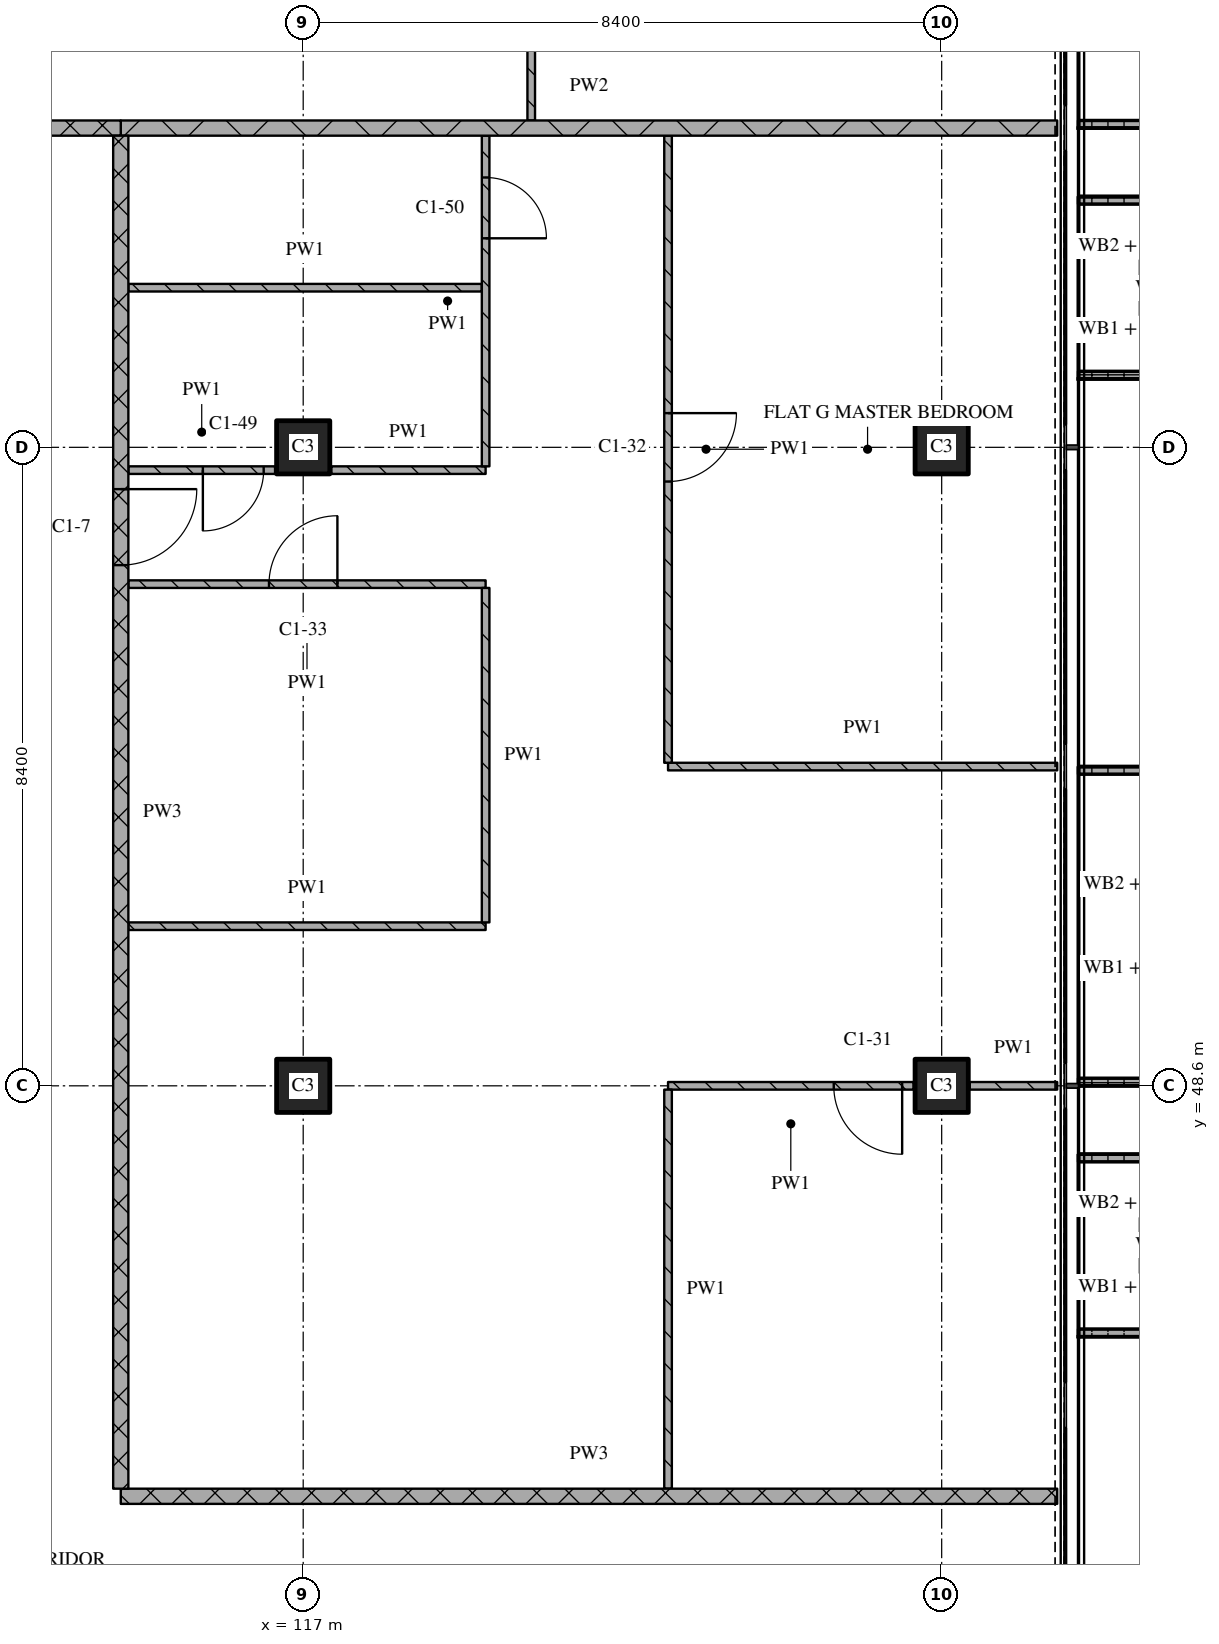
"""IFC4 building model, lengths in metres.
Left out: names, types, materials, properties, quantities, classifications, styles, units other than length and angle.
Written with IfcOpenShell. Run it as: python <this file> out.ifc"""

import sys

from ifc_helpers import new_model, si_unit, direction, frame, frame_2d, origin, origin_2d, place, context, subcontext, project, spatial, polyline, rectangle, outline, extrude, element, fill, save


model = new_model("IFC4")
c1 = context("Model", 3, precision=1e-05, world=origin(), true_north=direction((0.0, 1.0)))
c2 = subcontext(c1, "Body", "Model", "MODEL_VIEW")
j1 = project(units=[si_unit("LENGTHUNIT", "METRE"), si_unit("PLANEANGLEUNIT", "RADIAN")], contexts=[c1])
p1 = place(None, origin())
s1 = spatial("IfcSite", under=j1, at=p1, CompositionType="ELEMENT")
p2 = place(p1, origin())
s2 = spatial("IfcBuilding", under=s1, at=p2, CompositionType="ELEMENT")
p3 = place(p2, frame((0.0, 0.0, 147.45)))
s3 = spatial("IfcBuildingStorey", under=s2, at=p3, CompositionType="ELEMENT", Elevation=147.45)
for number, where, z_axis, x_axis in (
    (1, (117.0, 48.6, 0.0), (0.0, 0.0, 1.0), (1.0, 0.0, 0.0)),
    (2, (117.0, 57.0, 0.0), (0.0, 0.0, 1.0), (1.0, 0.0, 0.0)),
    (3, (125.4, 48.6, 0.0), (0.0, 0.0, 1.0), (1.0, 0.0, 0.0)),
    (4, (125.4, 57.0, 0.0), (0.0, 0.0, 1.0), (1.0, 0.0, 0.0)),
):
    element("IfcColumn", number, at=place(p3, frame(where, z_axis=z_axis, x_axis=x_axis)), inside=s3, PredefinedType="COLUMN", context=c2, shape_type="SweptSolid", body=[
        extrude(rectangle(XDim=0.7, YDim=0.7, at=origin_2d()), origin(), (0.0, 0.0, 1.0), 3.6),
    ])
p4 = place(p3, origin())
e5 = element("IfcWall", 5, at=p4, inside=s3, PredefinedType="SOLIDWALL", context=c2, shape_type="SweptSolid", body=[
    extrude(outline(polyline([(127.2, 45.3), (127.2, 45.4), (128.7, 45.4), (128.7, 47.6), (127.2, 47.6), (127.2, 47.7), (128.8, 47.7), (128.8, 45.3), (127.2, 45.3)])), origin(), (0.0, 0.0, 1.0), 1.0),
])
p5 = place(p3, origin())
e6 = element("IfcWall", 6, at=p5, inside=s3, PredefinedType="SOLIDWALL", context=c2, shape_type="SweptSolid", body=[
    extrude(outline(polyline([(127.2, 48.6), (127.2, 48.7), (128.833, 48.7), (128.833, 52.7), (127.2, 52.7), (127.2, 52.8), (128.933, 52.8), (128.933, 48.6), (127.2, 48.6)])), origin(), (0.0, 0.0, 1.0), 1.0),
])
p6 = place(p3, origin())
e7 = element("IfcWall", 7, at=p6, inside=s3, PredefinedType="SOLIDWALL", context=c2, shape_type="SweptSolid", body=[
    extrude(outline(polyline([(127.2, 57.9), (127.2, 58.0), (128.7, 58.0), (128.7, 60.2), (127.2, 60.2), (127.2, 60.3), (128.8, 60.3), (128.8, 57.9), (127.2, 57.9)])), origin(), (0.0, 0.0, 1.0), 1.0),
])
p7 = place(p3, origin())
e8 = element("IfcWall", 8, at=p7, inside=s3, PredefinedType="SOLIDWALL", context=c2, shape_type="SweptSolid", body=[
    extrude(outline(polyline([(127.2, 61.2), (127.2, 61.3), (128.833, 61.3), (128.833, 65.3), (127.2, 65.3), (127.2, 65.4), (128.933, 65.4), (128.933, 61.2), (127.2, 61.2)])), origin(), (0.0, 0.0, 1.0), 1.0),
])
p8 = place(p3, frame((114.6, 43.2, 0.0), z_axis=(0.0, 0.0, 1.0), x_axis=(1.0, 0.0, 0.0)))
e9 = element("IfcWall", 9, at=p8, inside=s3, PredefinedType="PARTITIONING", context=c2, shape_type="SweptSolid", body=[
    extrude(rectangle(XDim=12.32, YDim=0.2, at=frame_2d((6.16, 0.0))), origin(), (0.0, 0.0, 1.0), 3.32),
])
p9 = place(p3, frame((125.03, 48.6, 0.0), z_axis=(0.0, 0.0, 1.0), x_axis=(-1.0, 0.0, 0.0)))
e10 = element("IfcWall", 10, at=p9, inside=s3, PredefinedType="PARTITIONING", context=c2, shape_type="SweptSolid", body=[
    extrude(rectangle(XDim=3.23, YDim=0.1, at=frame_2d((1.615, 0.0))), origin(), (0.0, 0.0, 1.0), 3.32),
])
p10 = place(p9, frame((0.15, 0.0, 0.0)))
e11 = element("IfcOpeningElement", 11, at=p10, cuts=e10, PredefinedType="OPENING", context=c2, shape_type="SweptSolid", body=[
    extrude(rectangle(XDim=0.9, YDim=2.1, at=frame_2d((0.45, 1.05))), frame((0.0, 0.06, 0.0), z_axis=(0.0, -1.0, 0.0), x_axis=(1.0, 0.0, 0.0)), (0.0, 0.0, 1.0), 0.12),
])
p11 = place(p3, frame((125.77, 48.6, 0.0), z_axis=(0.0, 0.0, 1.0), x_axis=(1.0, 0.0, 0.0)))
e12 = element("IfcWall", 12, at=p11, inside=s3, PredefinedType="PARTITIONING", context=c2, shape_type="SweptSolid", body=[
    extrude(rectangle(XDim=1.15, YDim=0.1, at=frame_2d((0.575, 0.0))), origin(), (0.0, 0.0, 1.0), 3.32),
])
p12 = place(p3, frame((114.7, 50.7, 0.0), z_axis=(0.0, 0.0, 1.0), x_axis=(1.0, 0.0, 0.0)))
e13 = element("IfcWall", 13, at=p12, inside=s3, PredefinedType="PARTITIONING", context=c2, shape_type="SweptSolid", body=[
    extrude(rectangle(XDim=4.7, YDim=0.1, at=frame_2d((2.35, 0.0))), origin(), (0.0, 0.0, 1.0), 3.32),
])
p13 = place(p3, frame((121.8, 52.8, 0.0), z_axis=(0.0, 0.0, 1.0), x_axis=(1.0, 0.0, 0.0)))
e14 = element("IfcWall", 14, at=p13, inside=s3, PredefinedType="PARTITIONING", context=c2, shape_type="SweptSolid", body=[
    extrude(rectangle(XDim=5.12, YDim=0.1, at=frame_2d((2.56, 0.0))), origin(), (0.0, 0.0, 1.0), 3.32),
])
p14 = place(p3, frame((119.4, 55.2, 0.0), z_axis=(0.0, 0.0, 1.0), x_axis=(-1.0, 0.0, 0.0)))
e15 = element("IfcWall", 15, at=p14, inside=s3, PredefinedType="PARTITIONING", context=c2, shape_type="SweptSolid", body=[
    extrude(rectangle(XDim=4.7, YDim=0.1, at=frame_2d((2.35, 0.0))), origin(), (0.0, 0.0, 1.0), 3.32),
])
p15 = place(p14, frame((1.95, 0.0, 0.0)))
e16 = element("IfcOpeningElement", 16, at=p15, cuts=e15, PredefinedType="OPENING", context=c2, shape_type="SweptSolid", body=[
    extrude(rectangle(XDim=0.9, YDim=2.1, at=frame_2d((0.45, 1.05))), frame((0.0, 0.06, 0.0), z_axis=(0.0, -1.0, 0.0), x_axis=(1.0, 0.0, 0.0)), (0.0, 0.0, 1.0), 0.12),
])
p16 = place(p3, frame((114.7, 56.7, 0.0), z_axis=(0.0, 0.0, 1.0), x_axis=(1.0, 0.0, 0.0)))
e17 = element("IfcWall", 17, at=p16, inside=s3, PredefinedType="PARTITIONING", context=c2, shape_type="SweptSolid", body=[
    extrude(rectangle(XDim=1.93, YDim=0.1, at=frame_2d((0.965, 0.0))), origin(), (0.0, 0.0, 1.0), 3.32),
])
p17 = place(p16, frame((0.98, 0.0, 0.0)))
e18 = element("IfcOpeningElement", 18, at=p17, cuts=e17, PredefinedType="OPENING", context=c2, shape_type="SweptSolid", body=[
    extrude(rectangle(XDim=0.8, YDim=2.1, at=frame_2d((0.4, 1.05))), frame((0.0, 0.06, 0.0), z_axis=(0.0, -1.0, 0.0), x_axis=(1.0, 0.0, 0.0)), (0.0, 0.0, 1.0), 0.12),
])
p18 = place(p3, frame((117.37, 56.7, 0.0), z_axis=(0.0, 0.0, 1.0), x_axis=(1.0, 0.0, 0.0)))
e19 = element("IfcWall", 19, at=p18, inside=s3, PredefinedType="PARTITIONING", context=c2, shape_type="SweptSolid", body=[
    extrude(rectangle(XDim=2.03, YDim=0.1, at=frame_2d((1.015, 0.0))), origin(), (0.0, 0.0, 1.0), 3.32),
])
p19 = place(p3, frame((114.7, 59.1, 0.0), z_axis=(0.0, 0.0, 1.0), x_axis=(1.0, 0.0, 0.0)))
e20 = element("IfcWall", 20, at=p19, inside=s3, PredefinedType="PARTITIONING", context=c2, shape_type="SweptSolid", body=[
    extrude(rectangle(XDim=4.65, YDim=0.1, at=frame_2d((2.325, 0.0))), origin(), (0.0, 0.0, 1.0), 3.32),
])
p20 = place(p3, frame((111.0, 61.2, 0.0), z_axis=(0.0, 0.0, 1.0), x_axis=(1.0, 0.0, 0.0)))
e21 = element("IfcWall", 21, at=p20, inside=s3, PredefinedType="PARTITIONING", context=c2, shape_type="SweptSolid", body=[
    extrude(rectangle(XDim=3.6, YDim=0.2, at=frame_2d((1.8, 0.0))), origin(), (0.0, 0.0, 1.0), 3.32),
])
p21 = place(p3, frame((114.6, 61.2, 0.0), z_axis=(0.0, 0.0, 1.0), x_axis=(1.0, 0.0, 0.0)))
e22 = element("IfcWall", 22, at=p21, inside=s3, PredefinedType="PARTITIONING", context=c2, shape_type="SweptSolid", body=[
    extrude(rectangle(XDim=12.32, YDim=0.2, at=frame_2d((6.16, 0.0))), origin(), (0.0, 0.0, 1.0), 3.32),
])
p22 = place(p3, frame((114.6, 61.1, 0.0), z_axis=(0.0, 0.0, 1.0), x_axis=(0.0, -1.0, 0.0)))
e23 = element("IfcWall", 23, at=p22, inside=s3, PredefinedType="PARTITIONING", context=c2, shape_type="SweptSolid", body=[
    extrude(rectangle(XDim=17.8, YDim=0.2, at=frame_2d((8.9, 0.0))), origin(), (0.0, 0.0, 1.0), 3.32),
])
p23 = place(p22, frame((4.65, 0.0, 0.0)))
e24 = element("IfcOpeningElement", 24, at=p23, cuts=e23, PredefinedType="OPENING", context=c2, shape_type="SweptSolid", body=[
    extrude(rectangle(XDim=1.0, YDim=2.1, at=frame_2d((0.5, 1.05))), frame((0.0, 0.11, 0.0), z_axis=(0.0, -1.0, 0.0), x_axis=(1.0, 0.0, 0.0)), (0.0, 0.0, 1.0), 0.22),
])
p24 = place(p3, frame((119.4, 55.15, 0.0), z_axis=(0.0, 0.0, 1.0), x_axis=(0.0, -1.0, 0.0)))
e25 = element("IfcWall", 25, at=p24, inside=s3, PredefinedType="PARTITIONING", context=c2, shape_type="SweptSolid", body=[
    extrude(rectangle(XDim=4.4, YDim=0.1, at=frame_2d((2.2, 0.0))), origin(), (0.0, 0.0, 1.0), 3.32),
])
p25 = place(p3, frame((119.4, 56.75, 0.0), z_axis=(0.0, 0.0, 1.0), x_axis=(0.0, 1.0, 0.0)))
e26 = element("IfcWall", 26, at=p25, inside=s3, PredefinedType="PARTITIONING", context=c2, shape_type="SweptSolid", body=[
    extrude(rectangle(XDim=4.35, YDim=0.1, at=frame_2d((2.175, 0.0))), origin(), (0.0, 0.0, 1.0), 3.32),
])
p26 = place(p25, frame((3.0, 0.0, 0.0)))
e27 = element("IfcOpeningElement", 27, at=p26, cuts=e26, PredefinedType="OPENING", context=c2, shape_type="SweptSolid", body=[
    extrude(rectangle(XDim=0.8, YDim=2.1, at=frame_2d((0.4, 1.05))), frame((0.0, 0.06, 0.0), z_axis=(0.0, -1.0, 0.0), x_axis=(1.0, 0.0, 0.0)), (0.0, 0.0, 1.0), 0.12),
])
p27 = place(p3, frame((120.0, 65.35, 0.0), z_axis=(0.0, 0.0, 1.0), x_axis=(0.0, -1.0, 0.0)))
e28 = element("IfcWall", 28, at=p27, inside=s3, PredefinedType="PARTITIONING", context=c2, shape_type="SweptSolid", body=[
    extrude(rectangle(XDim=4.05, YDim=0.1, at=frame_2d((2.025, 0.0))), origin(), (0.0, 0.0, 1.0), 3.32),
])
p28 = place(p3, frame((121.8, 48.55, 0.0), z_axis=(0.0, 0.0, 1.0), x_axis=(0.0, -1.0, 0.0)))
e29 = element("IfcWall", 29, at=p28, inside=s3, PredefinedType="PARTITIONING", context=c2, shape_type="SweptSolid", body=[
    extrude(rectangle(XDim=5.25, YDim=0.1, at=frame_2d((2.625, 0.0))), origin(), (0.0, 0.0, 1.0), 3.32),
])
p29 = place(p3, frame((121.8, 61.1, 0.0), z_axis=(0.0, 0.0, 1.0), x_axis=(0.0, -1.0, 0.0)))
e30 = element("IfcWall", 30, at=p29, inside=s3, PredefinedType="PARTITIONING", context=c2, shape_type="SweptSolid", body=[
    extrude(rectangle(XDim=8.25, YDim=0.1, at=frame_2d((4.125, 0.0))), origin(), (0.0, 0.0, 1.0), 3.32),
])
p30 = place(p29, frame((3.65, 0.0, 0.0)))
e31 = element("IfcOpeningElement", 31, at=p30, cuts=e30, PredefinedType="OPENING", context=c2, shape_type="SweptSolid", body=[
    extrude(rectangle(XDim=0.9, YDim=2.1, at=frame_2d((0.45, 1.05))), frame((0.0, 0.06, 0.0), z_axis=(0.0, -1.0, 0.0), x_axis=(1.0, 0.0, 0.0)), (0.0, 0.0, 1.0), 0.12),
])
p31 = place(p10, origin())
e32 = element("IfcDoor", 32, at=p31, inside=s3, OperationType="SINGLE_SWING_LEFT", PredefinedType="DOOR", context=c2, shape_type="SweptSolid", body=[
    extrude(rectangle(XDim=0.9, YDim=2.1, at=frame_2d((0.45, 1.05))), frame((0.0, 0.025, 0.0), z_axis=(0.0, -1.0, 0.0), x_axis=(1.0, 0.0, 0.0)), (0.0, 0.0, 1.0), 0.05),
])
fill(e11, e32)
p32 = place(p15, origin())
e33 = element("IfcDoor", 33, at=p32, inside=s3, OperationType="SINGLE_SWING_RIGHT", PredefinedType="DOOR", context=c2, shape_type="SweptSolid", body=[
    extrude(rectangle(XDim=0.9, YDim=2.1, at=frame_2d((0.45, 1.05))), frame((0.0, 0.025, 0.0), z_axis=(0.0, -1.0, 0.0), x_axis=(1.0, 0.0, 0.0)), (0.0, 0.0, 1.0), 0.05),
])
fill(e16, e33)
p33 = place(p17, origin())
e34 = element("IfcDoor", 34, at=p33, inside=s3, OperationType="SINGLE_SWING_RIGHT", PredefinedType="DOOR", context=c2, shape_type="SweptSolid", body=[
    extrude(rectangle(XDim=0.8, YDim=2.1, at=frame_2d((0.4, 1.05))), frame((0.0, 0.025, 0.0), z_axis=(0.0, -1.0, 0.0), x_axis=(1.0, 0.0, 0.0)), (0.0, 0.0, 1.0), 0.05),
])
fill(e18, e34)
p34 = place(p23, origin())
e35 = element("IfcDoor", 35, at=p34, inside=s3, OperationType="SINGLE_SWING_LEFT", PredefinedType="DOOR", context=c2, shape_type="SweptSolid", body=[
    extrude(rectangle(XDim=1.0, YDim=2.1, at=frame_2d((0.5, 1.05))), frame((0.0, 0.025, 0.0), z_axis=(0.0, -1.0, 0.0), x_axis=(1.0, 0.0, 0.0)), (0.0, 0.0, 1.0), 0.05),
])
fill(e24, e35)
p35 = place(p26, origin())
e36 = element("IfcDoor", 36, at=p35, inside=s3, OperationType="SINGLE_SWING_RIGHT", PredefinedType="DOOR", context=c2, shape_type="SweptSolid", body=[
    extrude(rectangle(XDim=0.8, YDim=2.1, at=frame_2d((0.4, 1.05))), frame((0.0, 0.025, 0.0), z_axis=(0.0, -1.0, 0.0), x_axis=(1.0, 0.0, 0.0)), (0.0, 0.0, 1.0), 0.05),
])
fill(e27, e36)
p36 = place(p30, origin())
e37 = element("IfcDoor", 37, at=p36, inside=s3, OperationType="SINGLE_SWING_LEFT", PredefinedType="DOOR", context=c2, shape_type="SweptSolid", body=[
    extrude(rectangle(XDim=0.9, YDim=2.1, at=frame_2d((0.45, 1.05))), frame((0.0, 0.025, 0.0), z_axis=(0.0, -1.0, 0.0), x_axis=(1.0, 0.0, 0.0)), (0.0, 0.0, 1.0), 0.05),
])
fill(e31, e37)
save(model, sys.argv[1])
